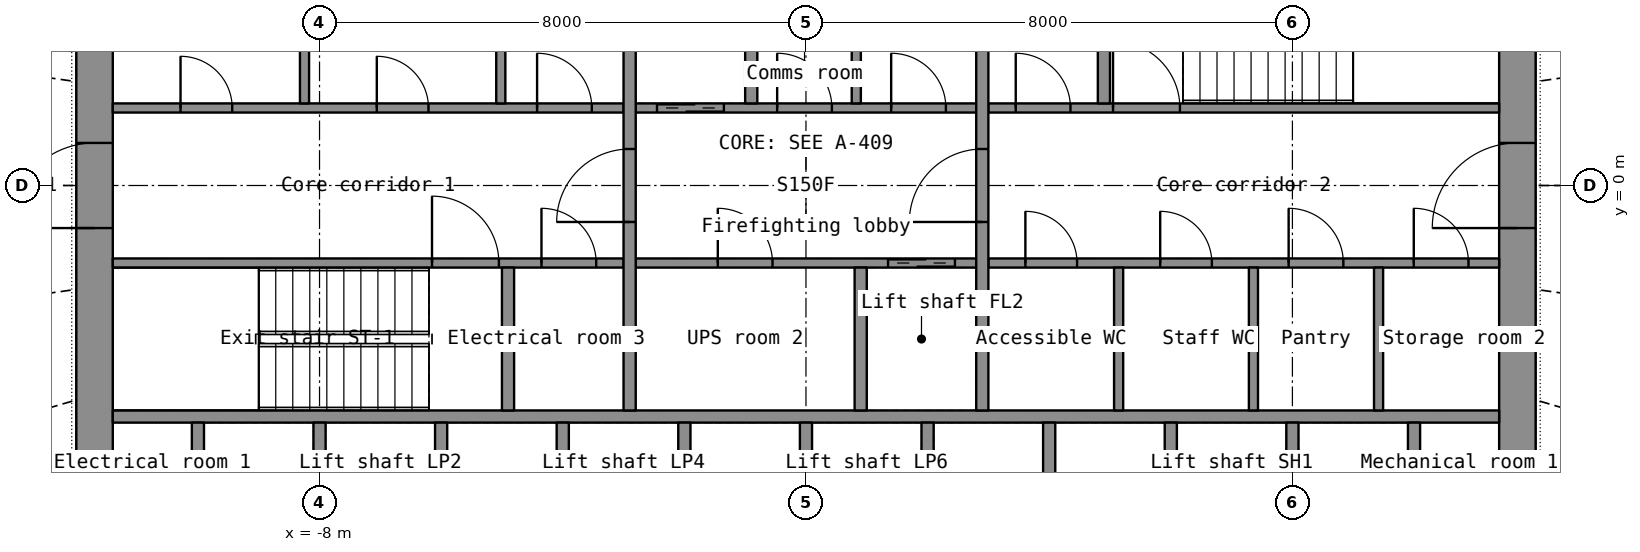
"""IFC4 building model, lengths in metres.
Left out: names, types, materials, properties, quantities, classifications, styles, units other than length and angle.
Written with IfcOpenShell. Run it as: python <this file> out.ifc"""

import sys

from ifc_helpers import new_model, si_unit, direction, frame, frame_2d, origin, place, context, subcontext, project, spatial, rectangle, extrude, element, fill, save


model = new_model("IFC4")
c1 = context("Model", 3, precision=1e-05, world=origin(), true_north=direction((0.0, 1.0)))
c2 = subcontext(c1, "Body", "Model", "MODEL_VIEW")
j1 = project(units=[si_unit("LENGTHUNIT", "METRE"), si_unit("PLANEANGLEUNIT", "RADIAN")], contexts=[c1])
p1 = place(None, origin())
s1 = spatial("IfcSite", under=j1, at=p1, CompositionType="ELEMENT")
p2 = place(p1, origin())
s2 = spatial("IfcBuilding", under=s1, at=p2, CompositionType="ELEMENT")
p3 = place(p2, frame((0.0, 0.0, 51.9)))
s3 = spatial("IfcBuildingStorey", under=s2, at=p3, CompositionType="ELEMENT", Elevation=51.9)
p4 = place(p3, frame((-11.7, -7.2, 0.0), z_axis=(0.0, 0.0, 1.0), x_axis=(0.0, 1.0, 0.0)))
e1 = element("IfcWall", 1, at=p4, inside=s3, PredefinedType="SHEAR", context=c2, shape_type="SweptSolid", body=[
    extrude(rectangle(XDim=14.4, YDim=0.6, at=frame_2d((7.2, 0.0))), origin(), (0.0, 0.0, 1.0), 3.3),
])
p5 = place(p4, frame((6.5, 0.0, 0.0)))
e2 = element("IfcOpeningElement", 2, at=p5, cuts=e1, PredefinedType="OPENING", context=c2, shape_type="SweptSolid", body=[
    extrude(rectangle(XDim=1.4, YDim=2.2, at=frame_2d((0.7, 1.1))), frame((0.0, 0.31, 0.0), z_axis=(0.0, -1.0, 0.0), x_axis=(1.0, 0.0, 0.0)), (0.0, 0.0, 1.0), 0.62),
])
p6 = place(p3, frame((11.7, -7.2, 0.0), z_axis=(0.0, 0.0, 1.0), x_axis=(0.0, 1.0, 0.0)))
e3 = element("IfcWall", 3, at=p6, inside=s3, PredefinedType="SHEAR", context=c2, shape_type="SweptSolid", body=[
    extrude(rectangle(XDim=14.4, YDim=0.6, at=frame_2d((7.2, 0.0))), origin(), (0.0, 0.0, 1.0), 3.3),
])
p7 = place(p6, frame((6.5, 0.0, 0.0)))
e4 = element("IfcOpeningElement", 4, at=p7, cuts=e3, PredefinedType="OPENING", context=c2, shape_type="SweptSolid", body=[
    extrude(rectangle(XDim=1.4, YDim=2.2, at=frame_2d((0.7, 1.1))), frame((0.0, 0.31, 0.0), z_axis=(0.0, -1.0, 0.0), x_axis=(1.0, 0.0, 0.0)), (0.0, 0.0, 1.0), 0.62),
])
p8 = place(p3, frame((-11.4, -3.8, 0.0), z_axis=(0.0, 0.0, 1.0), x_axis=(1.0, 0.0, 0.0)))
e5 = element("IfcWall", 5, at=p8, inside=s3, PredefinedType="SHEAR", context=c2, shape_type="SweptSolid", body=[
    extrude(rectangle(XDim=22.8, YDim=0.2, at=frame_2d((11.4, 0.0))), origin(), (0.0, 0.0, 1.0), 3.3),
])
for number, where, z_axis, x_axis in (
    (6, (-10.0, -6.6, 0.0), (0.0, 0.0, 1.0), (0.0, 1.0, 0.0)),
    (7, (-8.0, -6.6, 0.0), (0.0, 0.0, 1.0), (0.0, 1.0, 0.0)),
    (8, (-6.0, -6.6, 0.0), (0.0, 0.0, 1.0), (0.0, 1.0, 0.0)),
    (9, (-4.0, -6.6, 0.0), (0.0, 0.0, 1.0), (0.0, 1.0, 0.0)),
    (10, (-2.0, -6.6, 0.0), (0.0, 0.0, 1.0), (0.0, 1.0, 0.0)),
    (11, (0.0, -6.6, 0.0), (0.0, 0.0, 1.0), (0.0, 1.0, 0.0)),
    (12, (2.0, -6.6, 0.0), (0.0, 0.0, 1.0), (0.0, 1.0, 0.0)),
    (13, (4.0, -6.6, 0.0), (0.0, 0.0, 1.0), (0.0, 1.0, 0.0)),
    (14, (6.0, -6.6, 0.0), (0.0, 0.0, 1.0), (0.0, 1.0, 0.0)),
    (15, (8.0, -6.6, 0.0), (0.0, 0.0, 1.0), (0.0, 1.0, 0.0)),
    (16, (10.0, -6.6, 0.0), (0.0, 0.0, 1.0), (0.0, 1.0, 0.0)),
):
    element("IfcWall", number, at=place(p3, frame(where, z_axis=z_axis, x_axis=x_axis)), inside=s3, PredefinedType="SHEAR", context=c2, shape_type="SweptSolid", body=[
        extrude(rectangle(XDim=2.7, YDim=0.2, at=frame_2d((1.35, 0.0))), origin(), (0.0, 0.0, 1.0), 3.3),
    ])
p9 = place(p3, frame((-11.4, -1.275, 0.0), z_axis=(0.0, 0.0, 1.0), x_axis=(1.0, 0.0, 0.0)))
e17 = element("IfcWall", 17, at=p9, inside=s3, PredefinedType="SHEAR", context=c2, shape_type="SweptSolid", body=[
    extrude(rectangle(XDim=8.4, YDim=0.15, at=frame_2d((4.2, 0.0))), origin(), (0.0, 0.0, 1.0), 3.3),
])
p10 = place(p9, frame((5.25, 0.0, 0.0)))
e18 = element("IfcOpeningElement", 18, at=p10, cuts=e17, PredefinedType="OPENING", context=c2, shape_type="SweptSolid", body=[
    extrude(rectangle(XDim=1.1, YDim=2.15, at=frame_2d((0.55, 1.075))), frame((0.0, 0.085, 0.0), z_axis=(0.0, -1.0, 0.0), x_axis=(1.0, 0.0, 0.0)), (0.0, 0.0, 1.0), 0.17),
])
p11 = place(p9, frame((7.05, 0.0, 0.0)))
e19 = element("IfcOpeningElement", 19, at=p11, cuts=e17, PredefinedType="OPENING", context=c2, shape_type="SweptSolid", body=[
    extrude(rectangle(XDim=0.9, YDim=2.1, at=frame_2d((0.45, 1.05))), frame((0.0, 0.085, 0.0), z_axis=(0.0, -1.0, 0.0), x_axis=(1.0, 0.0, 0.0)), (0.0, 0.0, 1.0), 0.17),
])
p12 = place(p3, frame((-2.8, -1.275, 0.0), z_axis=(0.0, 0.0, 1.0), x_axis=(1.0, 0.0, 0.0)))
e20 = element("IfcWall", 20, at=p12, inside=s3, PredefinedType="SHEAR", context=c2, shape_type="SweptSolid", body=[
    extrude(rectangle(XDim=5.6, YDim=0.15, at=frame_2d((2.8, 0.0))), origin(), (0.0, 0.0, 1.0), 3.3),
])
p13 = place(p12, frame((4.15, 0.0, 0.0)))
e21 = element("IfcOpeningElement", 21, at=p13, cuts=e20, PredefinedType="OPENING", context=c2, shape_type="SweptSolid", body=[
    extrude(rectangle(XDim=1.1, YDim=2.2, at=frame_2d((0.55, 1.1))), frame((0.0, 0.085, 0.0), z_axis=(0.0, -1.0, 0.0), x_axis=(1.0, 0.0, 0.0)), (0.0, 0.0, 1.0), 0.17),
])
p14 = place(p12, frame((1.35, 0.0, 0.0)))
e22 = element("IfcOpeningElement", 22, at=p14, cuts=e20, PredefinedType="OPENING", context=c2, shape_type="SweptSolid", body=[
    extrude(rectangle(XDim=0.9, YDim=2.1, at=frame_2d((0.45, 1.05))), frame((0.0, 0.085, 0.0), z_axis=(0.0, -1.0, 0.0), x_axis=(1.0, 0.0, 0.0)), (0.0, 0.0, 1.0), 0.17),
])
p15 = place(p3, frame((3.0, -1.275, 0.0), z_axis=(0.0, 0.0, 1.0), x_axis=(1.0, 0.0, 0.0)))
e23 = element("IfcWall", 23, at=p15, inside=s3, PredefinedType="PARTITIONING", context=c2, shape_type="SweptSolid", body=[
    extrude(rectangle(XDim=8.4, YDim=0.15, at=frame_2d((4.2, 0.0))), origin(), (0.0, 0.0, 1.0), 3.3),
])
p16 = place(p15, frame((0.608, 0.0, 0.0)))
e24 = element("IfcOpeningElement", 24, at=p16, cuts=e23, PredefinedType="OPENING", context=c2, shape_type="SweptSolid", body=[
    extrude(rectangle(XDim=0.85, YDim=2.1, at=frame_2d((0.425, 1.05))), frame((0.0, 0.085, 0.0), z_axis=(0.0, -1.0, 0.0), x_axis=(1.0, 0.0, 0.0)), (0.0, 0.0, 1.0), 0.17),
])
p17 = place(p15, frame((2.825, 0.0, 0.0)))
e25 = element("IfcOpeningElement", 25, at=p17, cuts=e23, PredefinedType="OPENING", context=c2, shape_type="SweptSolid", body=[
    extrude(rectangle(XDim=0.85, YDim=2.1, at=frame_2d((0.425, 1.05))), frame((0.0, 0.085, 0.0), z_axis=(0.0, -1.0, 0.0), x_axis=(1.0, 0.0, 0.0)), (0.0, 0.0, 1.0), 0.17),
])
p18 = place(p15, frame((4.938, 0.0, 0.0)))
e26 = element("IfcOpeningElement", 26, at=p18, cuts=e23, PredefinedType="OPENING", context=c2, shape_type="SweptSolid", body=[
    extrude(rectangle(XDim=0.9, YDim=2.1, at=frame_2d((0.45, 1.05))), frame((0.0, 0.085, 0.0), z_axis=(0.0, -1.0, 0.0), x_axis=(1.0, 0.0, 0.0)), (0.0, 0.0, 1.0), 0.17),
])
p19 = place(p15, frame((6.996, 0.0, 0.0)))
e27 = element("IfcOpeningElement", 27, at=p19, cuts=e23, PredefinedType="OPENING", context=c2, shape_type="SweptSolid", body=[
    extrude(rectangle(XDim=0.9, YDim=2.1, at=frame_2d((0.45, 1.05))), frame((0.0, 0.085, 0.0), z_axis=(0.0, -1.0, 0.0), x_axis=(1.0, 0.0, 0.0)), (0.0, 0.0, 1.0), 0.17),
])
p20 = place(p3, frame((-11.4, 1.275, 0.0), z_axis=(0.0, 0.0, 1.0), x_axis=(1.0, 0.0, 0.0)))
e28 = element("IfcWall", 28, at=p20, inside=s3, PredefinedType="PARTITIONING", context=c2, shape_type="SweptSolid", body=[
    extrude(rectangle(XDim=8.4, YDim=0.15, at=frame_2d((4.2, 0.0))), origin(), (0.0, 0.0, 1.0), 3.3),
])
p21 = place(p20, frame((1.114, 0.0, 0.0)))
e29 = element("IfcOpeningElement", 29, at=p21, cuts=e28, PredefinedType="OPENING", context=c2, shape_type="SweptSolid", body=[
    extrude(rectangle(XDim=0.85, YDim=2.1, at=frame_2d((0.425, 1.05))), frame((0.0, 0.085, 0.0), z_axis=(0.0, -1.0, 0.0), x_axis=(1.0, 0.0, 0.0)), (0.0, 0.0, 1.0), 0.17),
])
p22 = place(p20, frame((4.342, 0.0, 0.0)))
e30 = element("IfcOpeningElement", 30, at=p22, cuts=e28, PredefinedType="OPENING", context=c2, shape_type="SweptSolid", body=[
    extrude(rectangle(XDim=0.85, YDim=2.1, at=frame_2d((0.425, 1.05))), frame((0.0, 0.085, 0.0), z_axis=(0.0, -1.0, 0.0), x_axis=(1.0, 0.0, 0.0)), (0.0, 0.0, 1.0), 0.17),
])
p23 = place(p20, frame((6.978, 0.0, 0.0)))
e31 = element("IfcOpeningElement", 31, at=p23, cuts=e28, PredefinedType="OPENING", context=c2, shape_type="SweptSolid", body=[
    extrude(rectangle(XDim=0.9, YDim=2.1, at=frame_2d((0.45, 1.05))), frame((0.0, 0.085, 0.0), z_axis=(0.0, -1.0, 0.0), x_axis=(1.0, 0.0, 0.0)), (0.0, 0.0, 1.0), 0.17),
])
p24 = place(p3, frame((-2.8, 1.275, 0.0), z_axis=(0.0, 0.0, 1.0), x_axis=(1.0, 0.0, 0.0)))
e32 = element("IfcWall", 32, at=p24, inside=s3, PredefinedType="SHEAR", context=c2, shape_type="SweptSolid", body=[
    extrude(rectangle(XDim=5.6, YDim=0.15, at=frame_2d((2.8, 0.0))), origin(), (0.0, 0.0, 1.0), 3.3),
])
p25 = place(p24, frame((0.35, 0.0, 0.0)))
e33 = element("IfcOpeningElement", 33, at=p25, cuts=e32, PredefinedType="OPENING", context=c2, shape_type="SweptSolid", body=[
    extrude(rectangle(XDim=1.1, YDim=2.2, at=frame_2d((0.55, 1.1))), frame((0.0, 0.085, 0.0), z_axis=(0.0, -1.0, 0.0), x_axis=(1.0, 0.0, 0.0)), (0.0, 0.0, 1.0), 0.17),
])
p26 = place(p24, frame((2.326, 0.0, 0.0)))
e34 = element("IfcOpeningElement", 34, at=p26, cuts=e32, PredefinedType="OPENING", context=c2, shape_type="SweptSolid", body=[
    extrude(rectangle(XDim=0.9, YDim=2.1, at=frame_2d((0.45, 1.05))), frame((0.0, 0.085, 0.0), z_axis=(0.0, -1.0, 0.0), x_axis=(1.0, 0.0, 0.0)), (0.0, 0.0, 1.0), 0.17),
])
p27 = place(p24, frame((4.201, 0.0, 0.0)))
e35 = element("IfcOpeningElement", 35, at=p27, cuts=e32, PredefinedType="OPENING", context=c2, shape_type="SweptSolid", body=[
    extrude(rectangle(XDim=0.9, YDim=2.1, at=frame_2d((0.45, 1.05))), frame((0.0, 0.085, 0.0), z_axis=(0.0, -1.0, 0.0), x_axis=(1.0, 0.0, 0.0)), (0.0, 0.0, 1.0), 0.17),
])
p28 = place(p3, frame((3.0, 1.275, 0.0), z_axis=(0.0, 0.0, 1.0), x_axis=(1.0, 0.0, 0.0)))
e36 = element("IfcWall", 36, at=p28, inside=s3, PredefinedType="SHEAR", context=c2, shape_type="SweptSolid", body=[
    extrude(rectangle(XDim=8.4, YDim=0.15, at=frame_2d((4.2, 0.0))), origin(), (0.0, 0.0, 1.0), 3.3),
])
p29 = place(p28, frame((2.05, 0.0, 0.0)))
e37 = element("IfcOpeningElement", 37, at=p29, cuts=e36, PredefinedType="OPENING", context=c2, shape_type="SweptSolid", body=[
    extrude(rectangle(XDim=1.1, YDim=2.15, at=frame_2d((0.55, 1.075))), frame((0.0, 0.085, 0.0), z_axis=(0.0, -1.0, 0.0), x_axis=(1.0, 0.0, 0.0)), (0.0, 0.0, 1.0), 0.17),
])
p30 = place(p28, frame((0.45, 0.0, 0.0)))
e38 = element("IfcOpeningElement", 38, at=p30, cuts=e36, PredefinedType="OPENING", context=c2, shape_type="SweptSolid", body=[
    extrude(rectangle(XDim=0.9, YDim=2.1, at=frame_2d((0.45, 1.05))), frame((0.0, 0.085, 0.0), z_axis=(0.0, -1.0, 0.0), x_axis=(1.0, 0.0, 0.0)), (0.0, 0.0, 1.0), 0.17),
])
p31 = place(p3, frame((-2.9, -3.7, 0.0), z_axis=(0.0, 0.0, 1.0), x_axis=(0.0, 1.0, 0.0)))
e39 = element("IfcWall", 39, at=p31, inside=s3, PredefinedType="SHEAR", context=c2, shape_type="SweptSolid", body=[
    extrude(rectangle(XDim=7.4, YDim=0.2, at=frame_2d((3.7, 0.0))), origin(), (0.0, 0.0, 1.0), 3.3),
])
p32 = place(p31, frame((3.1, 0.0, 0.0)))
e40 = element("IfcOpeningElement", 40, at=p32, cuts=e39, PredefinedType="OPENING", context=c2, shape_type="SweptSolid", body=[
    extrude(rectangle(XDim=1.2, YDim=2.2, at=frame_2d((0.6, 1.1))), frame((0.0, 0.11, 0.0), z_axis=(0.0, -1.0, 0.0), x_axis=(1.0, 0.0, 0.0)), (0.0, 0.0, 1.0), 0.22),
])
p33 = place(p3, frame((2.9, -3.7, 0.0), z_axis=(0.0, 0.0, 1.0), x_axis=(0.0, 1.0, 0.0)))
e41 = element("IfcWall", 41, at=p33, inside=s3, PredefinedType="SHEAR", context=c2, shape_type="SweptSolid", body=[
    extrude(rectangle(XDim=7.4, YDim=0.2, at=frame_2d((3.7, 0.0))), origin(), (0.0, 0.0, 1.0), 3.3),
])
p34 = place(p33, frame((3.1, 0.0, 0.0)))
e42 = element("IfcOpeningElement", 42, at=p34, cuts=e41, PredefinedType="OPENING", context=c2, shape_type="SweptSolid", body=[
    extrude(rectangle(XDim=1.2, YDim=2.2, at=frame_2d((0.6, 1.1))), frame((0.0, 0.11, 0.0), z_axis=(0.0, -1.0, 0.0), x_axis=(1.0, 0.0, 0.0)), (0.0, 0.0, 1.0), 0.22),
])
for number, where, z_axis, x_axis in (
    (43, (-0.9, 1.35, 0.0), (0.0, 0.0, 1.0), (0.0, 1.0, 0.0)),
    (44, (0.9, -3.7, 0.0), (0.0, 0.0, 1.0), (0.0, 1.0, 0.0)),
    (45, (-4.9, -3.7, 0.0), (0.0, 0.0, 1.0), (0.0, 1.0, 0.0)),
    (46, (4.9, 1.35, 0.0), (0.0, 0.0, 1.0), (0.0, 1.0, 0.0)),
):
    element("IfcWall", number, at=place(p3, frame(where, z_axis=z_axis, x_axis=x_axis)), inside=s3, PredefinedType="SHEAR", context=c2, shape_type="SweptSolid", body=[
        extrude(rectangle(XDim=2.35, YDim=0.2, at=frame_2d((1.175, 0.0))), origin(), (0.0, 0.0, 1.0), 3.3),
    ])
for number, where, z_axis, x_axis in (
    (47, (-8.247, 1.35, 0.0), (0.0, 0.0, 1.0), (0.0, 1.0, 0.0)),
    (48, (-5.019, 1.35, 0.0), (0.0, 0.0, 1.0), (0.0, 1.0, 0.0)),
    (49, (5.142, -3.7, 0.0), (0.0, 0.0, 1.0), (0.0, 1.0, 0.0)),
    (50, (7.359, -3.7, 0.0), (0.0, 0.0, 1.0), (0.0, 1.0, 0.0)),
    (51, (9.417, -3.7, 0.0), (0.0, 0.0, 1.0), (0.0, 1.0, 0.0)),
    (52, (0.827, 1.35, 0.0), (0.0, 0.0, 1.0), (0.0, 1.0, 0.0)),
):
    element("IfcWall", number, at=place(p3, frame(where, z_axis=z_axis, x_axis=x_axis)), inside=s3, PredefinedType="PARTITIONING", context=c2, shape_type="SweptSolid", body=[
        extrude(rectangle(XDim=2.35, YDim=0.15, at=frame_2d((1.175, 0.0))), origin(), (0.0, 0.0, 1.0), 3.3),
    ])
p35 = place(p5, origin())
e53 = element("IfcDoor", 53, at=p35, inside=s3, OperationType="DOUBLE_DOOR_SINGLE_SWING", PredefinedType="DOOR", context=c2, shape_type="SweptSolid", body=[
    extrude(rectangle(XDim=1.4, YDim=2.2, at=frame_2d((0.7, 1.1))), frame((0.0, 0.025, 0.0), z_axis=(0.0, -1.0, 0.0), x_axis=(1.0, 0.0, 0.0)), (0.0, 0.0, 1.0), 0.05),
])
fill(e2, e53)
p36 = place(p7, origin())
e54 = element("IfcDoor", 54, at=p36, inside=s3, OperationType="DOUBLE_DOOR_SINGLE_SWING", PredefinedType="DOOR", context=c2, shape_type="SweptSolid", body=[
    extrude(rectangle(XDim=1.4, YDim=2.2, at=frame_2d((0.7, 1.1))), frame((0.0, 0.025, 0.0), z_axis=(0.0, -1.0, 0.0), x_axis=(1.0, 0.0, 0.0)), (0.0, 0.0, 1.0), 0.05),
])
fill(e4, e54)
p37 = place(p32, origin())
e55 = element("IfcDoor", 55, at=p37, inside=s3, OperationType="SINGLE_SWING_LEFT", PredefinedType="DOOR", context=c2, shape_type="SweptSolid", body=[
    extrude(rectangle(XDim=1.2, YDim=2.2, at=frame_2d((0.6, 1.1))), frame((0.0, 0.025, 0.0), z_axis=(0.0, -1.0, 0.0), x_axis=(1.0, 0.0, 0.0)), (0.0, 0.0, 1.0), 0.05),
])
fill(e40, e55)
p38 = place(p34, origin())
e56 = element("IfcDoor", 56, at=p38, inside=s3, OperationType="SINGLE_SWING_LEFT", PredefinedType="DOOR", context=c2, shape_type="SweptSolid", body=[
    extrude(rectangle(XDim=1.2, YDim=2.2, at=frame_2d((0.6, 1.1))), frame((0.0, 0.025, 0.0), z_axis=(0.0, -1.0, 0.0), x_axis=(1.0, 0.0, 0.0)), (0.0, 0.0, 1.0), 0.05),
])
fill(e42, e56)
p39 = place(p25, origin())
e57 = element("IfcDoor", 57, at=p39, inside=s3, OperationType="DOUBLE_DOOR_SLIDING", PredefinedType="DOOR", context=c2, shape_type="SweptSolid", body=[
    extrude(rectangle(XDim=1.1, YDim=2.2, at=frame_2d((0.55, 1.1))), frame((0.0, 0.025, 0.0), z_axis=(0.0, -1.0, 0.0), x_axis=(1.0, 0.0, 0.0)), (0.0, 0.0, 1.0), 0.05),
])
fill(e33, e57)
p40 = place(p13, origin())
e58 = element("IfcDoor", 58, at=p40, inside=s3, OperationType="DOUBLE_DOOR_SLIDING", PredefinedType="DOOR", context=c2, shape_type="SweptSolid", body=[
    extrude(rectangle(XDim=1.1, YDim=2.2, at=frame_2d((0.55, 1.1))), frame((0.0, 0.025, 0.0), z_axis=(0.0, -1.0, 0.0), x_axis=(1.0, 0.0, 0.0)), (0.0, 0.0, 1.0), 0.05),
])
fill(e21, e58)
p41 = place(p10, origin())
e59 = element("IfcDoor", 59, at=p41, inside=s3, OperationType="SINGLE_SWING_LEFT", PredefinedType="DOOR", context=c2, shape_type="SweptSolid", body=[
    extrude(rectangle(XDim=1.1, YDim=2.15, at=frame_2d((0.55, 1.075))), frame((0.0, 0.025, 0.0), z_axis=(0.0, -1.0, 0.0), x_axis=(1.0, 0.0, 0.0)), (0.0, 0.0, 1.0), 0.05),
])
fill(e18, e59)
p42 = place(p29, origin())
e60 = element("IfcDoor", 60, at=p42, inside=s3, OperationType="SINGLE_SWING_LEFT", PredefinedType="DOOR", context=c2, shape_type="SweptSolid", body=[
    extrude(rectangle(XDim=1.1, YDim=2.15, at=frame_2d((0.55, 1.075))), frame((0.0, 0.025, 0.0), z_axis=(0.0, -1.0, 0.0), x_axis=(1.0, 0.0, 0.0)), (0.0, 0.0, 1.0), 0.05),
])
fill(e37, e60)
p43 = place(p21, origin())
e61 = element("IfcDoor", 61, at=p43, inside=s3, OperationType="SINGLE_SWING_LEFT", PredefinedType="DOOR", context=c2, shape_type="SweptSolid", body=[
    extrude(rectangle(XDim=0.85, YDim=2.1, at=frame_2d((0.425, 1.05))), frame((0.0, 0.025, 0.0), z_axis=(0.0, -1.0, 0.0), x_axis=(1.0, 0.0, 0.0)), (0.0, 0.0, 1.0), 0.05),
])
fill(e29, e61)
p44 = place(p22, origin())
e62 = element("IfcDoor", 62, at=p44, inside=s3, OperationType="SINGLE_SWING_LEFT", PredefinedType="DOOR", context=c2, shape_type="SweptSolid", body=[
    extrude(rectangle(XDim=0.85, YDim=2.1, at=frame_2d((0.425, 1.05))), frame((0.0, 0.025, 0.0), z_axis=(0.0, -1.0, 0.0), x_axis=(1.0, 0.0, 0.0)), (0.0, 0.0, 1.0), 0.05),
])
fill(e30, e62)
p45 = place(p23, origin())
e63 = element("IfcDoor", 63, at=p45, inside=s3, OperationType="SINGLE_SWING_LEFT", PredefinedType="DOOR", context=c2, shape_type="SweptSolid", body=[
    extrude(rectangle(XDim=0.9, YDim=2.1, at=frame_2d((0.45, 1.05))), frame((0.0, 0.025, 0.0), z_axis=(0.0, -1.0, 0.0), x_axis=(1.0, 0.0, 0.0)), (0.0, 0.0, 1.0), 0.05),
])
fill(e31, e63)
p46 = place(p16, origin())
e64 = element("IfcDoor", 64, at=p46, inside=s3, OperationType="SINGLE_SWING_LEFT", PredefinedType="DOOR", context=c2, shape_type="SweptSolid", body=[
    extrude(rectangle(XDim=0.85, YDim=2.1, at=frame_2d((0.425, 1.05))), frame((0.0, 0.025, 0.0), z_axis=(0.0, -1.0, 0.0), x_axis=(1.0, 0.0, 0.0)), (0.0, 0.0, 1.0), 0.05),
])
fill(e24, e64)
p47 = place(p17, origin())
e65 = element("IfcDoor", 65, at=p47, inside=s3, OperationType="SINGLE_SWING_LEFT", PredefinedType="DOOR", context=c2, shape_type="SweptSolid", body=[
    extrude(rectangle(XDim=0.85, YDim=2.1, at=frame_2d((0.425, 1.05))), frame((0.0, 0.025, 0.0), z_axis=(0.0, -1.0, 0.0), x_axis=(1.0, 0.0, 0.0)), (0.0, 0.0, 1.0), 0.05),
])
fill(e25, e65)
p48 = place(p18, origin())
e66 = element("IfcDoor", 66, at=p48, inside=s3, OperationType="SINGLE_SWING_LEFT", PredefinedType="DOOR", context=c2, shape_type="SweptSolid", body=[
    extrude(rectangle(XDim=0.9, YDim=2.1, at=frame_2d((0.45, 1.05))), frame((0.0, 0.025, 0.0), z_axis=(0.0, -1.0, 0.0), x_axis=(1.0, 0.0, 0.0)), (0.0, 0.0, 1.0), 0.05),
])
fill(e26, e66)
p49 = place(p19, origin())
e67 = element("IfcDoor", 67, at=p49, inside=s3, OperationType="SINGLE_SWING_LEFT", PredefinedType="DOOR", context=c2, shape_type="SweptSolid", body=[
    extrude(rectangle(XDim=0.9, YDim=2.1, at=frame_2d((0.45, 1.05))), frame((0.0, 0.025, 0.0), z_axis=(0.0, -1.0, 0.0), x_axis=(1.0, 0.0, 0.0)), (0.0, 0.0, 1.0), 0.05),
])
fill(e27, e67)
p50 = place(p26, origin())
e68 = element("IfcDoor", 68, at=p50, inside=s3, OperationType="SINGLE_SWING_LEFT", PredefinedType="DOOR", context=c2, shape_type="SweptSolid", body=[
    extrude(rectangle(XDim=0.9, YDim=2.1, at=frame_2d((0.45, 1.05))), frame((0.0, 0.025, 0.0), z_axis=(0.0, -1.0, 0.0), x_axis=(1.0, 0.0, 0.0)), (0.0, 0.0, 1.0), 0.05),
])
fill(e34, e68)
p51 = place(p27, origin())
e69 = element("IfcDoor", 69, at=p51, inside=s3, OperationType="SINGLE_SWING_LEFT", PredefinedType="DOOR", context=c2, shape_type="SweptSolid", body=[
    extrude(rectangle(XDim=0.9, YDim=2.1, at=frame_2d((0.45, 1.05))), frame((0.0, 0.025, 0.0), z_axis=(0.0, -1.0, 0.0), x_axis=(1.0, 0.0, 0.0)), (0.0, 0.0, 1.0), 0.05),
])
fill(e35, e69)
p52 = place(p14, origin())
e70 = element("IfcDoor", 70, at=p52, inside=s3, OperationType="SINGLE_SWING_LEFT", PredefinedType="DOOR", context=c2, shape_type="SweptSolid", body=[
    extrude(rectangle(XDim=0.9, YDim=2.1, at=frame_2d((0.45, 1.05))), frame((0.0, 0.025, 0.0), z_axis=(0.0, -1.0, 0.0), x_axis=(1.0, 0.0, 0.0)), (0.0, 0.0, 1.0), 0.05),
])
fill(e22, e70)
p53 = place(p30, origin())
e71 = element("IfcDoor", 71, at=p53, inside=s3, OperationType="SINGLE_SWING_LEFT", PredefinedType="DOOR", context=c2, shape_type="SweptSolid", body=[
    extrude(rectangle(XDim=0.9, YDim=2.1, at=frame_2d((0.45, 1.05))), frame((0.0, 0.025, 0.0), z_axis=(0.0, -1.0, 0.0), x_axis=(1.0, 0.0, 0.0)), (0.0, 0.0, 1.0), 0.05),
])
fill(e38, e71)
p54 = place(p11, origin())
e72 = element("IfcDoor", 72, at=p54, inside=s3, OperationType="SINGLE_SWING_LEFT", PredefinedType="DOOR", context=c2, shape_type="SweptSolid", body=[
    extrude(rectangle(XDim=0.9, YDim=2.1, at=frame_2d((0.45, 1.05))), frame((0.0, 0.025, 0.0), z_axis=(0.0, -1.0, 0.0), x_axis=(1.0, 0.0, 0.0)), (0.0, 0.0, 1.0), 0.05),
])
fill(e19, e72)
save(model, sys.argv[1])
